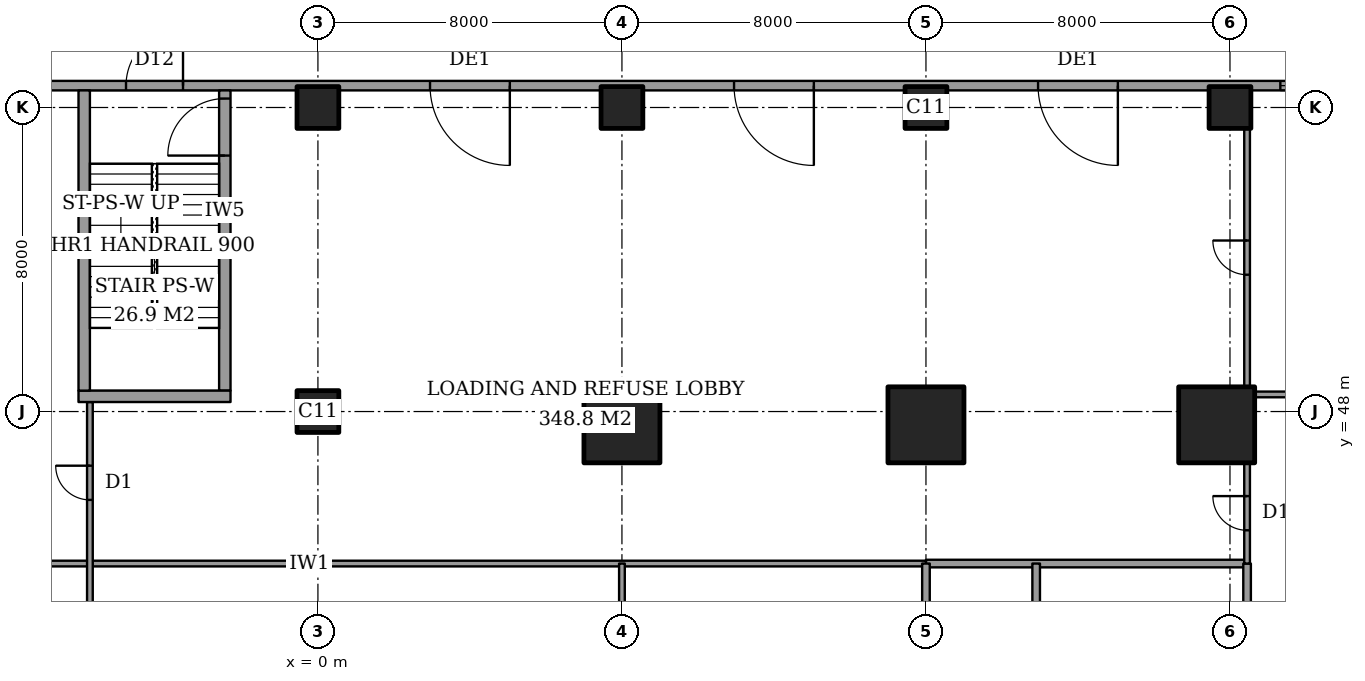
"""IFC4 building model, lengths in metres.
Left out: names, types, materials, properties, quantities, classifications, styles, units other than length and angle.
Written with IfcOpenShell. Run it as: python <this file> out.ifc"""

import sys

from ifc_helpers import new_model, si_unit, direction, frame, frame_2d, origin, origin_2d, place, context, subcontext, project, spatial, rectangle, extrude, element, fill, save


model = new_model("IFC4")
c1 = context("Model", 3, precision=1e-05, world=origin(), true_north=direction((0.0, 1.0)))
c2 = subcontext(c1, "Body", "Model", "MODEL_VIEW")
j1 = project(units=[si_unit("LENGTHUNIT", "METRE"), si_unit("PLANEANGLEUNIT", "RADIAN")], contexts=[c1])
p1 = place(None, origin())
s1 = spatial("IfcSite", under=j1, at=p1, CompositionType="ELEMENT")
p2 = place(p1, origin())
s2 = spatial("IfcBuilding", under=s1, at=p2, CompositionType="ELEMENT")
p3 = place(p2, origin())
s3 = spatial("IfcBuildingStorey", under=s2, at=p3, CompositionType="ELEMENT", Elevation=0.0)
for number, where, z_axis, x_axis in (
    (1, (0.0, 48.0, 0.0), (0.0, 0.0, 1.0), (1.0, 0.0, 0.0)),
    (2, (0.0, 56.0, 0.0), (0.0, 0.0, 1.0), (1.0, 0.0, 0.0)),
):
    element("IfcColumn", number, at=place(p3, frame(where, z_axis=z_axis, x_axis=x_axis)), inside=s3, PredefinedType="COLUMN", context=c2, shape_type="SweptSolid", body=[
        extrude(rectangle(XDim=1.1, YDim=1.1, at=origin_2d()), origin(), (0.0, 0.0, 1.0), 6.0),
    ])
p4 = place(p3, frame((8.0, 47.65, 0.0), z_axis=(0.0, 0.0, 1.0), x_axis=(1.0, 0.0, 0.0)))
e3 = element("IfcColumn", 3, at=p4, inside=s3, PredefinedType="COLUMN", context=c2, shape_type="SweptSolid", body=[
    extrude(rectangle(XDim=2.0, YDim=2.0, at=origin_2d()), origin(), (0.0, 0.0, 1.0), 6.0),
])
p5 = place(p3, frame((8.0, 56.0, 0.0), z_axis=(0.0, 0.0, 1.0), x_axis=(1.0, 0.0, 0.0)))
e4 = element("IfcColumn", 4, at=p5, inside=s3, PredefinedType="COLUMN", context=c2, shape_type="SweptSolid", body=[
    extrude(rectangle(XDim=1.1, YDim=1.1, at=origin_2d()), origin(), (0.0, 0.0, 1.0), 6.0),
])
p6 = place(p3, frame((16.0, 47.65, 0.0), z_axis=(0.0, 0.0, 1.0), x_axis=(1.0, 0.0, 0.0)))
e5 = element("IfcColumn", 5, at=p6, inside=s3, PredefinedType="COLUMN", context=c2, shape_type="SweptSolid", body=[
    extrude(rectangle(XDim=2.0, YDim=2.0, at=origin_2d()), origin(), (0.0, 0.0, 1.0), 6.0),
])
p7 = place(p3, frame((16.0, 56.0, 0.0), z_axis=(0.0, 0.0, 1.0), x_axis=(1.0, 0.0, 0.0)))
e6 = element("IfcColumn", 6, at=p7, inside=s3, PredefinedType="COLUMN", context=c2, shape_type="SweptSolid", body=[
    extrude(rectangle(XDim=1.1, YDim=1.1, at=origin_2d()), origin(), (0.0, 0.0, 1.0), 6.0),
])
p8 = place(p3, frame((23.65, 47.65, 0.0), z_axis=(0.0, 0.0, 1.0), x_axis=(1.0, 0.0, 0.0)))
e7 = element("IfcColumn", 7, at=p8, inside=s3, PredefinedType="COLUMN", context=c2, shape_type="SweptSolid", body=[
    extrude(rectangle(XDim=2.0, YDim=2.0, at=origin_2d()), origin(), (0.0, 0.0, 1.0), 6.0),
])
p9 = place(p3, frame((24.0, 56.0, 0.0), z_axis=(0.0, 0.0, 1.0), x_axis=(1.0, 0.0, 0.0)))
e8 = element("IfcColumn", 8, at=p9, inside=s3, PredefinedType="COLUMN", context=c2, shape_type="SweptSolid", body=[
    extrude(rectangle(XDim=1.1, YDim=1.1, at=origin_2d()), origin(), (0.0, 0.0, 1.0), 6.0),
])
p10 = place(p3, frame((74.825, 56.575, 0.0), z_axis=(0.0, 0.0, 1.0), x_axis=(-1.0, 0.0, 0.0)))
e9 = element("IfcWall", 9, at=p10, inside=s3, PredefinedType="SOLIDWALL", context=c2, shape_type="SweptSolid", body=[
    extrude(rectangle(XDim=91.4, YDim=0.25, at=frame_2d((45.7, 0.0))), origin(), (0.0, 0.0, 1.0), 6.0),
])
p11 = place(p10, frame((27.025, 0.0, 0.0)))
e10 = element("IfcOpeningElement", 10, at=p11, cuts=e9, PredefinedType="OPENING", context=c2, shape_type="SweptSolid", body=[
    extrude(rectangle(XDim=3.6, YDim=3.6, at=frame_2d((1.8, 1.8))), frame((0.0, 0.135, 0.0), z_axis=(0.0, -1.0, 0.0), x_axis=(1.0, 0.0, 0.0)), (0.0, 0.0, 1.0), 0.27),
])
p12 = place(p10, frame((9.863, 0.0, 0.3)))
e11 = element("IfcOpeningElement", 11, at=p12, cuts=e9, PredefinedType="OPENING", context=c2, shape_type="SweptSolid", body=[
    extrude(rectangle(XDim=2.4, YDim=3.6, at=frame_2d((1.2, 1.8))), frame((0.0, 0.135, 0.0), z_axis=(0.0, -1.0, 0.0), x_axis=(1.0, 0.0, 0.0)), (0.0, 0.0, 1.0), 0.27),
])
p13 = place(p10, frame((13.238, 0.0, 0.3)))
e12 = element("IfcOpeningElement", 12, at=p13, cuts=e9, PredefinedType="OPENING", context=c2, shape_type="SweptSolid", body=[
    extrude(rectangle(XDim=2.4, YDim=3.6, at=frame_2d((1.2, 1.8))), frame((0.0, 0.135, 0.0), z_axis=(0.0, -1.0, 0.0), x_axis=(1.0, 0.0, 0.0)), (0.0, 0.0, 1.0), 0.27),
])
p14 = place(p10, frame((17.975, 0.0, 0.3)))
e13 = element("IfcOpeningElement", 13, at=p14, cuts=e9, PredefinedType="OPENING", context=c2, shape_type="SweptSolid", body=[
    extrude(rectangle(XDim=2.4, YDim=3.6, at=frame_2d((1.2, 1.8))), frame((0.0, 0.135, 0.0), z_axis=(0.0, -1.0, 0.0), x_axis=(1.0, 0.0, 0.0)), (0.0, 0.0, 1.0), 0.27),
])
p15 = place(p10, frame((21.275, 0.0, 0.3)))
e14 = element("IfcOpeningElement", 14, at=p15, cuts=e9, PredefinedType="OPENING", context=c2, shape_type="SweptSolid", body=[
    extrude(rectangle(XDim=2.4, YDim=3.6, at=frame_2d((1.2, 1.8))), frame((0.0, 0.135, 0.0), z_axis=(0.0, -1.0, 0.0), x_axis=(1.0, 0.0, 0.0)), (0.0, 0.0, 1.0), 0.27),
])
p16 = place(p10, frame((34.15, 0.0, 0.3)))
e15 = element("IfcOpeningElement", 15, at=p16, cuts=e9, PredefinedType="OPENING", context=c2, shape_type="SweptSolid", body=[
    extrude(rectangle(XDim=2.4, YDim=3.6, at=frame_2d((1.2, 1.8))), frame((0.0, 0.135, 0.0), z_axis=(0.0, -1.0, 0.0), x_axis=(1.0, 0.0, 0.0)), (0.0, 0.0, 1.0), 0.27),
])
p17 = place(p10, frame((38.1, 0.0, 0.3)))
e16 = element("IfcOpeningElement", 16, at=p17, cuts=e9, PredefinedType="OPENING", context=c2, shape_type="SweptSolid", body=[
    extrude(rectangle(XDim=2.4, YDim=3.6, at=frame_2d((1.2, 1.8))), frame((0.0, 0.135, 0.0), z_axis=(0.0, -1.0, 0.0), x_axis=(1.0, 0.0, 0.0)), (0.0, 0.0, 1.0), 0.27),
])
p18 = place(p10, frame((43.15, 0.0, 0.3)))
e17 = element("IfcOpeningElement", 17, at=p18, cuts=e9, PredefinedType="OPENING", context=c2, shape_type="SweptSolid", body=[
    extrude(rectangle(XDim=2.4, YDim=3.6, at=frame_2d((1.2, 1.8))), frame((0.0, 0.135, 0.0), z_axis=(0.0, -1.0, 0.0), x_axis=(1.0, 0.0, 0.0)), (0.0, 0.0, 1.0), 0.27),
])
p19 = place(p10, frame((47.1, 0.0, 0.3)))
e18 = element("IfcOpeningElement", 18, at=p19, cuts=e9, PredefinedType="OPENING", context=c2, shape_type="SweptSolid", body=[
    extrude(rectangle(XDim=2.4, YDim=3.6, at=frame_2d((1.2, 1.8))), frame((0.0, 0.135, 0.0), z_axis=(0.0, -1.0, 0.0), x_axis=(1.0, 0.0, 0.0)), (0.0, 0.0, 1.0), 0.27),
])
p20 = place(p10, frame((53.775, 0.0, 0.0)))
e19 = element("IfcOpeningElement", 19, at=p20, cuts=e9, PredefinedType="OPENING", context=c2, shape_type="SweptSolid", body=[
    extrude(rectangle(XDim=2.1, YDim=2.4, at=frame_2d((1.05, 1.2))), frame((0.0, 0.135, 0.0), z_axis=(0.0, -1.0, 0.0), x_axis=(1.0, 0.0, 0.0)), (0.0, 0.0, 1.0), 0.27),
])
p21 = place(p10, frame((61.775, 0.0, 0.0)))
e20 = element("IfcOpeningElement", 20, at=p21, cuts=e9, PredefinedType="OPENING", context=c2, shape_type="SweptSolid", body=[
    extrude(rectangle(XDim=2.1, YDim=2.4, at=frame_2d((1.05, 1.2))), frame((0.0, 0.135, 0.0), z_axis=(0.0, -1.0, 0.0), x_axis=(1.0, 0.0, 0.0)), (0.0, 0.0, 1.0), 0.27),
])
p22 = place(p10, frame((69.775, 0.0, 0.0)))
e21 = element("IfcOpeningElement", 21, at=p22, cuts=e9, PredefinedType="OPENING", context=c2, shape_type="SweptSolid", body=[
    extrude(rectangle(XDim=2.1, YDim=2.4, at=frame_2d((1.05, 1.2))), frame((0.0, 0.135, 0.0), z_axis=(0.0, -1.0, 0.0), x_axis=(1.0, 0.0, 0.0)), (0.0, 0.0, 1.0), 0.27),
])
p23 = place(p10, frame((83.9, 0.0, 0.3)))
e22 = element("IfcOpeningElement", 22, at=p23, cuts=e9, PredefinedType="OPENING", context=c2, shape_type="SweptSolid", body=[
    extrude(rectangle(XDim=2.4, YDim=3.6, at=frame_2d((1.2, 1.8))), frame((0.0, 0.135, 0.0), z_axis=(0.0, -1.0, 0.0), x_axis=(1.0, 0.0, 0.0)), (0.0, 0.0, 1.0), 0.27),
])
p24 = place(p10, frame((87.35, 0.0, 0.3)))
e23 = element("IfcOpeningElement", 23, at=p24, cuts=e9, PredefinedType="OPENING", context=c2, shape_type="SweptSolid", body=[
    extrude(rectangle(XDim=2.4, YDim=3.6, at=frame_2d((1.2, 1.8))), frame((0.0, 0.135, 0.0), z_axis=(0.0, -1.0, 0.0), x_axis=(1.0, 0.0, 0.0)), (0.0, 0.0, 1.0), 0.27),
])
p25 = place(p10, frame((5.275, 0.0, 0.0), z_axis=(0.0, 0.0, 1.0), x_axis=(-1.0, 0.0, 0.0)))
e24 = element("IfcOpeningElement", 24, at=p25, cuts=e9, PredefinedType="OPENING", context=c2, shape_type="SweptSolid", body=[
    extrude(rectangle(XDim=1.5, YDim=2.1, at=frame_2d((0.75, 1.05))), frame((0.0, 0.135, 0.0), z_axis=(0.0, -1.0, 0.0), x_axis=(1.0, 0.0, 0.0)), (0.0, 0.0, 1.0), 0.27),
])
p26 = place(p10, frame((79.875, 0.0, 0.0), z_axis=(0.0, 0.0, 1.0), x_axis=(-1.0, 0.0, 0.0)))
e25 = element("IfcOpeningElement", 25, at=p26, cuts=e9, PredefinedType="OPENING", context=c2, shape_type="SweptSolid", body=[
    extrude(rectangle(XDim=1.5, YDim=2.1, at=frame_2d((0.75, 1.05))), frame((0.0, 0.135, 0.0), z_axis=(0.0, -1.0, 0.0), x_axis=(1.0, 0.0, 0.0)), (0.0, 0.0, 1.0), 0.27),
])
p27 = place(p3, frame((16.0, 44.0, 0.0), z_axis=(0.0, 0.0, 1.0), x_axis=(1.0, 0.0, 0.0)))
e26 = element("IfcWall", 26, at=p27, inside=s3, PredefinedType="PARTITIONING", context=c2, shape_type="SweptSolid", body=[
    extrude(rectangle(XDim=8.45, YDim=0.2, at=frame_2d((4.225, 0.0))), origin(), (0.0, 0.0, 1.0), 5.7),
])
p28 = place(p3, frame((-16.45, 44.0, 0.0), z_axis=(0.0, 0.0, 1.0), x_axis=(1.0, 0.0, 0.0)))
e27 = element("IfcWall", 27, at=p28, inside=s3, PredefinedType="PARTITIONING", context=c2, shape_type="SweptSolid", body=[
    extrude(rectangle(XDim=32.45, YDim=0.15, at=frame_2d((16.225, 0.0))), origin(), (0.0, 0.0, 1.0), 5.7),
])
p29 = place(p3, frame((24.65, 48.45, 0.0), z_axis=(0.0, 0.0, 1.0), x_axis=(1.0, 0.0, 0.0)))
e28 = element("IfcWall", 28, at=p29, inside=s3, PredefinedType="PARTITIONING", context=c2, shape_type="SweptSolid", body=[
    extrude(rectangle(XDim=7.8, YDim=0.15, at=frame_2d((3.9, 0.0))), origin(), (0.0, 0.0, 1.0), 5.7),
])
p30 = place(p3, frame((-6.0, 24.0, 0.0), z_axis=(0.0, 0.0, 1.0), x_axis=(0.0, 1.0, 0.0)))
e29 = element("IfcWall", 29, at=p30, inside=s3, PredefinedType="PARTITIONING", context=c2, shape_type="SweptSolid", body=[
    extrude(rectangle(XDim=24.25, YDim=0.15, at=frame_2d((12.125, 0.0))), origin(), (0.0, 0.0, 1.0), 5.7),
])
p31 = place(p30, frame((21.675, 0.0, 0.0)))
e30 = element("IfcOpeningElement", 30, at=p31, cuts=e29, PredefinedType="OPENING", context=c2, shape_type="SweptSolid", body=[
    extrude(rectangle(XDim=0.9, YDim=2.1, at=frame_2d((0.45, 1.05))), frame((0.0, 0.085, 0.0), z_axis=(0.0, -1.0, 0.0), x_axis=(1.0, 0.0, 0.0)), (0.0, 0.0, 1.0), 0.17),
])
p32 = place(p3, frame((8.0, 41.0, 0.0), z_axis=(0.0, 0.0, 1.0), x_axis=(0.0, 1.0, 0.0)))
e31 = element("IfcWall", 31, at=p32, inside=s3, PredefinedType="PARTITIONING", context=c2, shape_type="SweptSolid", body=[
    extrude(rectangle(XDim=3.0, YDim=0.15, at=frame_2d((1.5, 0.0))), origin(), (0.0, 0.0, 1.0), 4.3),
])
p33 = place(p3, frame((16.0, 41.0, 0.0), z_axis=(0.0, 0.0, 1.0), x_axis=(0.0, 1.0, 0.0)))
e32 = element("IfcWall", 32, at=p33, inside=s3, PredefinedType="PARTITIONING", context=c2, shape_type="SweptSolid", body=[
    extrude(rectangle(XDim=3.0, YDim=0.2, at=frame_2d((1.5, 0.0))), origin(), (0.0, 0.0, 1.0), 4.3),
])
p34 = place(p3, frame((18.9, 28.0, 0.0), z_axis=(0.0, 0.0, 1.0), x_axis=(0.0, 1.0, 0.0)))
e33 = element("IfcWall", 33, at=p34, inside=s3, PredefinedType="PARTITIONING", context=c2, shape_type="SweptSolid", body=[
    extrude(rectangle(XDim=16.0, YDim=0.2, at=frame_2d((8.0, 0.0))), origin(), (0.0, 0.0, 1.0), 5.7),
])
p35 = place(p34, frame((3.55, 0.0, 0.0)))
e34 = element("IfcOpeningElement", 34, at=p35, cuts=e33, PredefinedType="OPENING", context=c2, shape_type="SweptSolid", body=[
    extrude(rectangle(XDim=0.9, YDim=2.1, at=frame_2d((0.45, 1.05))), frame((0.0, 0.11, 0.0), z_axis=(0.0, -1.0, 0.0), x_axis=(1.0, 0.0, 0.0)), (0.0, 0.0, 1.0), 0.22),
])
p36 = place(p34, frame((7.55, 0.0, 0.0)))
e35 = element("IfcOpeningElement", 35, at=p36, cuts=e33, PredefinedType="OPENING", context=c2, shape_type="SweptSolid", body=[
    extrude(rectangle(XDim=0.9, YDim=2.1, at=frame_2d((0.45, 1.05))), frame((0.0, 0.11, 0.0), z_axis=(0.0, -1.0, 0.0), x_axis=(1.0, 0.0, 0.0)), (0.0, 0.0, 1.0), 0.22),
])
p37 = place(p34, frame((11.05, 0.0, 0.0)))
e36 = element("IfcOpeningElement", 36, at=p37, cuts=e33, PredefinedType="OPENING", context=c2, shape_type="SweptSolid", body=[
    extrude(rectangle(XDim=0.9, YDim=2.1, at=frame_2d((0.45, 1.05))), frame((0.0, 0.11, 0.0), z_axis=(0.0, -1.0, 0.0), x_axis=(1.0, 0.0, 0.0)), (0.0, 0.0, 1.0), 0.22),
])
p38 = place(p3, frame((24.45, 41.3, 0.0), z_axis=(0.0, 0.0, 1.0), x_axis=(0.0, 1.0, 0.0)))
e37 = element("IfcWall", 37, at=p38, inside=s3, PredefinedType="PARTITIONING", context=c2, shape_type="SweptSolid", body=[
    extrude(rectangle(XDim=2.7, YDim=0.2, at=frame_2d((1.35, 0.0))), origin(), (0.0, 0.0, 1.0), 5.7),
])
p39 = place(p3, frame((24.45, 44.0, 0.0), z_axis=(0.0, 0.0, 1.0), x_axis=(0.0, 1.0, 0.0)))
e38 = element("IfcWall", 38, at=p39, inside=s3, PredefinedType="PARTITIONING", context=c2, shape_type="SweptSolid", body=[
    extrude(rectangle(XDim=2.65, YDim=0.15, at=frame_2d((1.325, 0.0))), origin(), (0.0, 0.0, 1.0), 5.7),
])
p40 = place(p39, frame((0.875, 0.0, 0.0)))
e39 = element("IfcOpeningElement", 39, at=p40, cuts=e38, PredefinedType="OPENING", context=c2, shape_type="SweptSolid", body=[
    extrude(rectangle(XDim=0.9, YDim=2.1, at=frame_2d((0.45, 1.05))), frame((0.0, 0.085, 0.0), z_axis=(0.0, -1.0, 0.0), x_axis=(1.0, 0.0, 0.0)), (0.0, 0.0, 1.0), 0.17),
])
p41 = place(p3, frame((24.45, 48.65, 0.0), z_axis=(0.0, 0.0, 1.0), x_axis=(0.0, 1.0, 0.0)))
e40 = element("IfcWall", 40, at=p41, inside=s3, PredefinedType="PARTITIONING", context=c2, shape_type="SweptSolid", body=[
    extrude(rectangle(XDim=6.8, YDim=0.15, at=frame_2d((3.4, 0.0))), origin(), (0.0, 0.0, 1.0), 5.7),
])
p42 = place(p41, frame((2.95, 0.0, 0.0)))
e41 = element("IfcOpeningElement", 41, at=p42, cuts=e40, PredefinedType="OPENING", context=c2, shape_type="SweptSolid", body=[
    extrude(rectangle(XDim=0.9, YDim=2.1, at=frame_2d((0.45, 1.05))), frame((0.0, 0.085, 0.0), z_axis=(0.0, -1.0, 0.0), x_axis=(1.0, 0.0, 0.0)), (0.0, 0.0, 1.0), 0.17),
])
p43 = place(p3, frame((-6.3, 48.4, 0.0), z_axis=(0.0, 0.0, 1.0), x_axis=(1.0, 0.0, 0.0)))
e42 = element("IfcWall", 42, at=p43, inside=s3, PredefinedType="PARTITIONING", context=c2, shape_type="SweptSolid", body=[
    extrude(rectangle(XDim=4.0, YDim=0.3, at=frame_2d((2.0, 0.0))), origin(), (0.0, 0.0, 1.0), 6.0),
])
p44 = place(p3, frame((-6.15, 48.55, 0.0), z_axis=(0.0, 0.0, 1.0), x_axis=(0.0, 1.0, 0.0)))
e43 = element("IfcWall", 43, at=p44, inside=s3, PredefinedType="PARTITIONING", context=c2, shape_type="SweptSolid", body=[
    extrude(rectangle(XDim=7.9, YDim=0.3, at=frame_2d((3.95, 0.0))), origin(), (0.0, 0.0, 1.0), 6.0),
])
p45 = place(p3, frame((-2.45, 48.55, 0.0), z_axis=(0.0, 0.0, 1.0), x_axis=(0.0, 1.0, 0.0)))
e44 = element("IfcWall", 44, at=p45, inside=s3, PredefinedType="PARTITIONING", context=c2, shape_type="SweptSolid", body=[
    extrude(rectangle(XDim=7.9, YDim=0.3, at=frame_2d((3.95, 0.0))), origin(), (0.0, 0.0, 1.0), 6.0),
])
p46 = place(p45, frame((6.185, 0.0, 0.0)))
e45 = element("IfcOpeningElement", 45, at=p46, cuts=e44, PredefinedType="OPENING", context=c2, shape_type="SweptSolid", body=[
    extrude(rectangle(XDim=1.5, YDim=2.1, at=frame_2d((0.75, 1.05))), frame((0.0, 0.16, 0.0), z_axis=(0.0, -1.0, 0.0), x_axis=(1.0, 0.0, 0.0)), (0.0, 0.0, 1.0), 0.32),
])
p47 = place(p19, origin())
e46 = element("IfcWindow", 46, at=p47, inside=s3, PartitioningType="SINGLE_PANEL", PredefinedType="WINDOW", context=c2, shape_type="SweptSolid", body=[
    extrude(rectangle(XDim=2.4, YDim=3.6, at=frame_2d((1.2, 1.8))), frame((0.0, 0.03, 0.0), z_axis=(0.0, -1.0, 0.0), x_axis=(1.0, 0.0, 0.0)), (0.0, 0.0, 1.0), 0.06),
])
fill(e18, e46)
p48 = place(p20, origin())
e47 = element("IfcDoor", 47, at=p48, inside=s3, OperationType="DOUBLE_DOOR_DOUBLE_SWING", PredefinedType="DOOR", context=c2, shape_type="SweptSolid", body=[
    extrude(rectangle(XDim=2.1, YDim=2.4, at=frame_2d((1.05, 1.2))), frame((0.0, 0.025, 0.0), z_axis=(0.0, -1.0, 0.0), x_axis=(1.0, 0.0, 0.0)), (0.0, 0.0, 1.0), 0.05),
])
fill(e19, e47)
p49 = place(p21, origin())
e48 = element("IfcDoor", 48, at=p49, inside=s3, OperationType="DOUBLE_DOOR_DOUBLE_SWING", PredefinedType="DOOR", context=c2, shape_type="SweptSolid", body=[
    extrude(rectangle(XDim=2.1, YDim=2.4, at=frame_2d((1.05, 1.2))), frame((0.0, 0.025, 0.0), z_axis=(0.0, -1.0, 0.0), x_axis=(1.0, 0.0, 0.0)), (0.0, 0.0, 1.0), 0.05),
])
fill(e20, e48)
p50 = place(p22, origin())
e49 = element("IfcDoor", 49, at=p50, inside=s3, OperationType="DOUBLE_DOOR_DOUBLE_SWING", PredefinedType="DOOR", context=c2, shape_type="SweptSolid", body=[
    extrude(rectangle(XDim=2.1, YDim=2.4, at=frame_2d((1.05, 1.2))), frame((0.0, 0.025, 0.0), z_axis=(0.0, -1.0, 0.0), x_axis=(1.0, 0.0, 0.0)), (0.0, 0.0, 1.0), 0.05),
])
fill(e21, e49)
p51 = place(p31, origin())
e50 = element("IfcDoor", 50, at=p51, inside=s3, OperationType="SINGLE_SWING_LEFT", PredefinedType="DOOR", context=c2, shape_type="SweptSolid", body=[
    extrude(rectangle(XDim=0.9, YDim=2.1, at=frame_2d((0.45, 1.05))), frame((0.0, 0.025, 0.0), z_axis=(0.0, -1.0, 0.0), x_axis=(1.0, 0.0, 0.0)), (0.0, 0.0, 1.0), 0.05),
])
fill(e30, e50)
p52 = place(p40, origin())
e51 = element("IfcDoor", 51, at=p52, inside=s3, OperationType="SINGLE_SWING_LEFT", PredefinedType="DOOR", context=c2, shape_type="SweptSolid", body=[
    extrude(rectangle(XDim=0.9, YDim=2.1, at=frame_2d((0.45, 1.05))), frame((0.0, 0.025, 0.0), z_axis=(0.0, -1.0, 0.0), x_axis=(1.0, 0.0, 0.0)), (0.0, 0.0, 1.0), 0.05),
])
fill(e39, e51)
p53 = place(p42, origin())
e52 = element("IfcDoor", 52, at=p53, inside=s3, OperationType="SINGLE_SWING_LEFT", PredefinedType="DOOR", context=c2, shape_type="SweptSolid", body=[
    extrude(rectangle(XDim=0.9, YDim=2.1, at=frame_2d((0.45, 1.05))), frame((0.0, 0.025, 0.0), z_axis=(0.0, -1.0, 0.0), x_axis=(1.0, 0.0, 0.0)), (0.0, 0.0, 1.0), 0.05),
])
fill(e41, e52)
p54 = place(p46, origin())
e53 = element("IfcDoor", 53, at=p54, inside=s3, OperationType="DOUBLE_DOOR_SINGLE_SWING", PredefinedType="DOOR", context=c2, shape_type="SweptSolid", body=[
    extrude(rectangle(XDim=1.5, YDim=2.1, at=frame_2d((0.75, 1.05))), frame((0.0, 0.025, 0.0), z_axis=(0.0, -1.0, 0.0), x_axis=(1.0, 0.0, 0.0)), (0.0, 0.0, 1.0), 0.05),
])
fill(e45, e53)
p55 = place(p26, origin())
e54 = element("IfcDoor", 54, at=p55, inside=s3, OperationType="DOUBLE_DOOR_SINGLE_SWING", PredefinedType="DOOR", context=c2, shape_type="SweptSolid", body=[
    extrude(rectangle(XDim=1.5, YDim=2.1, at=frame_2d((0.75, 1.05))), frame((0.0, 0.025, 0.0), z_axis=(0.0, -1.0, 0.0), x_axis=(1.0, 0.0, 0.0)), (0.0, 0.0, 1.0), 0.05),
])
fill(e25, e54)
save(model, sys.argv[1])
